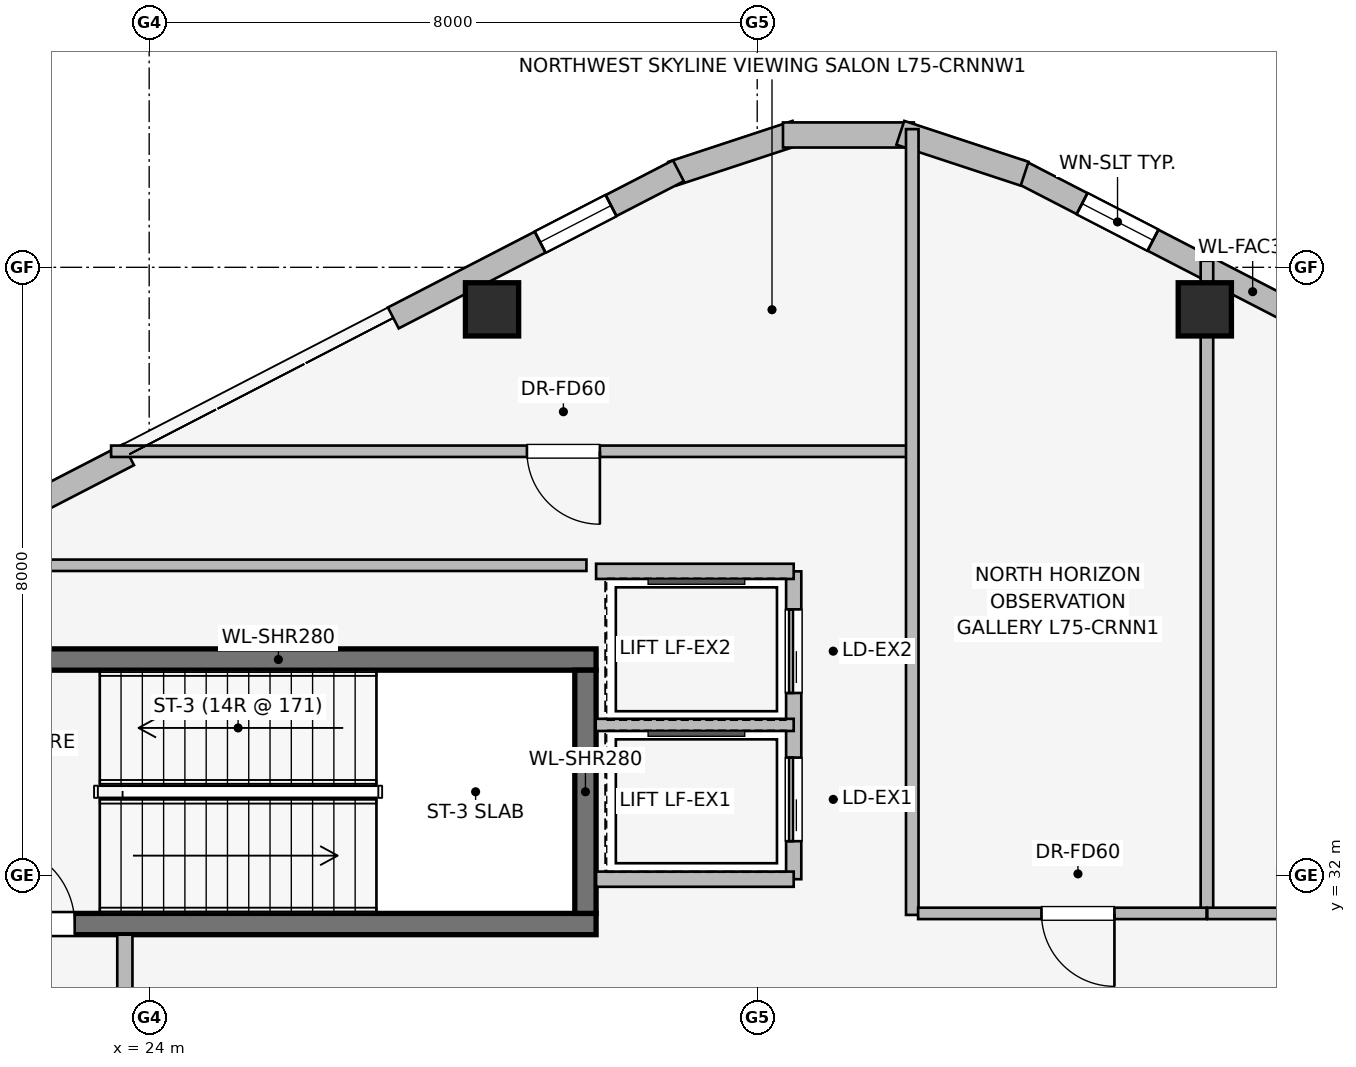
"""IFC4 building model, lengths in metres.
Left out: names, types, materials, properties, quantities, classifications, styles, units other than length and angle.
Written with IfcOpenShell. Run it as: python <this file> out.ifc"""

import sys

from ifc_helpers import new_model, si_unit, direction, frame, frame_2d, origin, origin_2d, place, context, subcontext, project, spatial, rectangle, extrude, element, fill, save


model = new_model("IFC4")
c1 = context("Model", 3, precision=1e-05, world=origin(), true_north=direction((0.0, 1.0)))
c2 = subcontext(c1, "Body", "Model", "MODEL_VIEW")
j1 = project(units=[si_unit("LENGTHUNIT", "METRE"), si_unit("PLANEANGLEUNIT", "RADIAN")], contexts=[c1])
p1 = place(None, origin())
s1 = spatial("IfcSite", under=j1, at=p1, CompositionType="ELEMENT")
p2 = place(p1, origin())
s2 = spatial("IfcBuilding", under=s1, at=p2, CompositionType="ELEMENT")
p3 = place(p2, frame((0.0, 0.0, 275.1)))
s3 = spatial("IfcBuildingStorey", under=s2, at=p3, CompositionType="ELEMENT", Elevation=275.1)
p4 = place(p3, frame((21.52, 31.36, 0.0), z_axis=(0.0, 0.0, 1.0), x_axis=(1.0, 0.0, 0.0)))
e1 = element("IfcWall", 1, at=p4, inside=s3, PredefinedType="SHEAR", context=c2, shape_type="SweptSolid", body=[
    extrude(rectangle(XDim=8.36, YDim=0.28, at=frame_2d((4.18, 0.0))), origin(), (0.0, 0.0, 1.0), 4.8),
])
p5 = place(p4, frame((0.45, 0.0, 0.0)))
e2 = element("IfcOpeningElement", 2, at=p5, cuts=e1, PredefinedType="OPENING", context=c2, shape_type="SweptSolid", body=[
    extrude(rectangle(XDim=1.05, YDim=2.0, at=frame_2d((0.525, 1.0))), frame((0.0, 0.15, 0.0), z_axis=(0.0, -1.0, 0.0), x_axis=(1.0, 0.0, 0.0)), (0.0, 0.0, 1.0), 0.3),
])
p6 = place(p3, frame((29.88, 34.84, 0.0), z_axis=(0.0, 0.0, 1.0), x_axis=(-1.0, 0.0, 0.0)))
e3 = element("IfcWall", 3, at=p6, inside=s3, PredefinedType="SHEAR", context=c2, shape_type="SweptSolid", body=[
    extrude(rectangle(XDim=8.36, YDim=0.28, at=frame_2d((4.18, 0.0))), origin(), (0.0, 0.0, 1.0), 4.8),
])
p7 = place(p3, frame((29.74, 31.5, 0.0), z_axis=(0.0, 0.0, 1.0), x_axis=(0.0, 1.0, 0.0)))
e4 = element("IfcWall", 4, at=p7, inside=s3, PredefinedType="SHEAR", context=c2, shape_type="SweptSolid", body=[
    extrude(rectangle(XDim=3.2, YDim=0.28, at=frame_2d((1.6, 0.0))), origin(), (0.0, 0.0, 1.0), 4.8),
])
for number, where, z_axis, x_axis in (
    (5, (37.889, 39.447, 0.0), (0.0, 0.0, 1.0), (1.0, 0.0, 0.0)),
    (6, (28.511, 39.447, 0.0), (0.0, 0.0, 1.0), (1.0, 0.0, 0.0)),
):
    element("IfcColumn", number, at=place(p3, frame(where, z_axis=z_axis, x_axis=x_axis)), inside=s3, PredefinedType="COLUMN", context=c2, shape_type="SweptSolid", body=[
        extrude(rectangle(XDim=0.7, YDim=0.7, at=origin_2d()), origin(), (0.0, 0.0, 1.0), 4.8),
    ])
p8 = place(p3, frame((35.437, 41.27, 0.0), z_axis=(0.0, 0.0, 1.0), x_axis=(0.888622971019, -0.458638436437, 0.0)))
e7 = element("IfcWall", 7, at=p8, inside=s3, PredefinedType="STANDARD", context=c2, shape_type="SweptSolid", body=[
    extrude(rectangle(XDim=6.936, YDim=0.31, at=frame_2d((3.468, 0.0))), origin(), (0.0, 0.0, 1.0), 4.49),
])
p9 = place(p8, frame((0.942, 0.0, 0.75)))
e8 = element("IfcOpeningElement", 8, at=p9, cuts=e7, PredefinedType="OPENING", context=c2, shape_type="SweptSolid", body=[
    extrude(rectangle(XDim=1.05, YDim=1.4, at=frame_2d((0.525, 0.7))), frame((0.0, 0.165, 0.0), z_axis=(0.0, -1.0, 0.0), x_axis=(1.0, 0.0, 0.0)), (0.0, 0.0, 1.0), 0.33),
])
p10 = place(p8, frame((4.435, 0.0, 0.75)))
e9 = element("IfcOpeningElement", 9, at=p10, cuts=e7, PredefinedType="OPENING", context=c2, shape_type="SweptSolid", body=[
    extrude(rectangle(XDim=1.05, YDim=1.4, at=frame_2d((0.525, 0.7))), frame((0.0, 0.165, 0.0), z_axis=(0.0, -1.0, 0.0), x_axis=(1.0, 0.0, 0.0)), (0.0, 0.0, 1.0), 0.33),
])
p11 = place(p3, frame((30.882, 41.231, 0.0), z_axis=(0.0, 0.0, 1.0), x_axis=(0.949713440491, 0.313120393699, 0.0)))
e10 = element("IfcWall", 10, at=p11, inside=s3, PredefinedType="STANDARD", context=c2, shape_type="SweptSolid", body=[
    extrude(rectangle(XDim=1.722, YDim=0.33, at=frame_2d((0.861, 0.0))), origin(), (0.0, 0.0, 1.0), 4.49),
])
p12 = place(p3, frame((32.339, 41.741, 0.0), z_axis=(0.0, 0.0, 1.0), x_axis=(1.0, 0.0, 0.0)))
e11 = element("IfcWall", 11, at=p12, inside=s3, PredefinedType="STANDARD", context=c2, shape_type="SweptSolid", body=[
    extrude(rectangle(XDim=1.722, YDim=0.33, at=frame_2d((0.861, 0.0))), origin(), (0.0, 0.0, 1.0), 4.49),
])
p13 = place(p3, frame((33.883, 41.77, 0.0), z_axis=(0.0, 0.0, 1.0), x_axis=(0.949713440491, -0.313120393699, 0.0)))
e12 = element("IfcWall", 12, at=p13, inside=s3, PredefinedType="STANDARD", context=c2, shape_type="SweptSolid", body=[
    extrude(rectangle(XDim=1.722, YDim=0.33, at=frame_2d((0.861, 0.0))), origin(), (0.0, 0.0, 1.0), 4.49),
])
p14 = place(p3, frame((17.566, 34.354, 0.0), z_axis=(0.0, 0.0, 1.0), x_axis=(0.888622971019, 0.458638436437, 0.0)))
e13 = element("IfcWall", 13, at=p14, inside=s3, PredefinedType="STANDARD", context=c2, shape_type="SweptSolid", body=[
    extrude(rectangle(XDim=6.936, YDim=0.31, at=frame_2d((3.468, 0.0))), origin(), (0.0, 0.0, 1.0), 4.49),
])
p15 = place(p14, frame((0.998, 0.0, 0.75)))
e14 = element("IfcOpeningElement", 14, at=p15, cuts=e13, PredefinedType="OPENING", context=c2, shape_type="SweptSolid", body=[
    extrude(rectangle(XDim=1.05, YDim=1.4, at=frame_2d((0.525, 0.7))), frame((0.0, 0.165, 0.0), z_axis=(0.0, -1.0, 0.0), x_axis=(1.0, 0.0, 0.0)), (0.0, 0.0, 1.0), 0.33),
])
p16 = place(p14, frame((4.403, 0.0, 0.75)))
e15 = element("IfcOpeningElement", 15, at=p16, cuts=e13, PredefinedType="OPENING", context=c2, shape_type="SweptSolid", body=[
    extrude(rectangle(XDim=1.05, YDim=1.4, at=frame_2d((0.525, 0.7))), frame((0.0, 0.165, 0.0), z_axis=(0.0, -1.0, 0.0), x_axis=(1.0, 0.0, 0.0)), (0.0, 0.0, 1.0), 0.33),
])
p17 = place(p3, frame((27.212, 39.334, 0.0), z_axis=(0.0, 0.0, 1.0), x_axis=(0.888616094641, 0.45865175934, 0.0)))
e16 = element("IfcWall", 16, at=p17, inside=s3, PredefinedType="STANDARD", context=c2, shape_type="SweptSolid", body=[
    extrude(rectangle(XDim=4.221, YDim=0.31, at=frame_2d((2.111, 0.0))), origin(), (0.0, 0.0, 1.0), 4.49),
])
p18 = place(p17, frame((2.174, 0.0, 0.75)))
e17 = element("IfcOpeningElement", 17, at=p18, cuts=e16, PredefinedType="OPENING", context=c2, shape_type="SweptSolid", body=[
    extrude(rectangle(XDim=1.05, YDim=1.4, at=frame_2d((0.525, 0.7))), frame((0.0, 0.165, 0.0), z_axis=(0.0, -1.0, 0.0), x_axis=(1.0, 0.0, 0.0)), (0.0, 0.0, 1.0), 0.33),
])
p19 = place(p3, frame((23.68, 25.68, 0.0), z_axis=(0.0, 0.0, 1.0), x_axis=(0.0, 1.0, 0.0)))
e18 = element("IfcWall", 18, at=p19, inside=s3, PredefinedType="PARTITIONING", context=c2, shape_type="SweptSolid", body=[
    extrude(rectangle(XDim=5.54, YDim=0.2, at=frame_2d((2.77, 0.0))), origin(), (0.0, 0.0, 1.0), 4.49),
])
p20 = place(p19, frame((1.8, 0.0, 0.0)))
e19 = element("IfcOpeningElement", 19, at=p20, cuts=e18, PredefinedType="OPENING", context=c2, shape_type="SweptSolid", body=[
    extrude(rectangle(XDim=1.05, YDim=2.0, at=frame_2d((0.525, 1.0))), frame((0.0, 0.11, 0.0), z_axis=(0.0, -1.0, 0.0), x_axis=(1.0, 0.0, 0.0)), (0.0, 0.0, 1.0), 0.22),
])
p21 = place(p3, frame((32.48, 31.95, 0.0), z_axis=(0.0, 0.0, 1.0), x_axis=(0.0, 1.0, 0.0)))
e20 = element("IfcWall", 20, at=p21, inside=s3, PredefinedType="PARTITIONING", context=c2, shape_type="SweptSolid", body=[
    extrude(rectangle(XDim=4.05, YDim=0.2, at=frame_2d((2.025, 0.0))), origin(), (0.0, 0.0, 1.0), 4.49),
])
p22 = place(p21, frame((0.5, 0.0, 0.0)))
e21 = element("IfcOpeningElement", 21, at=p22, cuts=e20, PredefinedType="OPENING", context=c2, shape_type="SweptSolid", body=[
    extrude(rectangle(XDim=1.1, YDim=2.2, at=frame_2d((0.55, 1.1))), frame((0.0, 0.11, 0.0), z_axis=(0.0, -1.0, 0.0), x_axis=(1.0, 0.0, 0.0)), (0.0, 0.0, 1.0), 0.22),
])
p23 = place(p21, frame((2.45, 0.0, 0.0)))
e22 = element("IfcOpeningElement", 22, at=p23, cuts=e20, PredefinedType="OPENING", context=c2, shape_type="SweptSolid", body=[
    extrude(rectangle(XDim=1.1, YDim=2.2, at=frame_2d((0.55, 1.1))), frame((0.0, 0.11, 0.0), z_axis=(0.0, -1.0, 0.0), x_axis=(1.0, 0.0, 0.0)), (0.0, 0.0, 1.0), 0.22),
])
p24 = place(p3, frame((29.88, 36.0, 0.0), z_axis=(0.0, 0.0, 1.0), x_axis=(1.0, 0.0, 0.0)))
e23 = element("IfcWall", 23, at=p24, inside=s3, PredefinedType="PARTITIONING", context=c2, shape_type="SweptSolid", body=[
    extrude(rectangle(XDim=2.6, YDim=0.2, at=frame_2d((1.3, 0.0))), origin(), (0.0, 0.0, 1.0), 4.49),
])
p25 = place(p3, frame((32.48, 31.95, 0.0), z_axis=(0.0, 0.0, 1.0), x_axis=(-1.0, 0.0, 0.0)))
e24 = element("IfcWall", 24, at=p25, inside=s3, PredefinedType="PARTITIONING", context=c2, shape_type="SweptSolid", body=[
    extrude(rectangle(XDim=2.6, YDim=0.2, at=frame_2d((1.3, 0.0))), origin(), (0.0, 0.0, 1.0), 3.882),
])
p26 = place(p3, frame((29.875, 33.98, 0.0), z_axis=(0.0, 0.0, 1.0), x_axis=(1.0, 0.0, 0.0)))
e25 = element("IfcWall", 25, at=p26, inside=s3, PredefinedType="PARTITIONING", context=c2, shape_type="SweptSolid", body=[
    extrude(rectangle(XDim=2.605, YDim=0.16, at=frame_2d((1.302, 0.0))), origin(), (0.0, 0.0, 1.0), 4.49),
])
p27 = place(p3, frame((34.0, 37.58, 0.0), z_axis=(0.0, 0.0, 1.0), x_axis=(-1.0, 0.0, 0.0)))
e26 = element("IfcWall", 26, at=p27, inside=s3, PredefinedType="PARTITIONING", context=c2, shape_type="SweptSolid", body=[
    extrude(rectangle(XDim=10.501, YDim=0.15, at=frame_2d((5.25, 0.0))), origin(), (0.0, 0.0, 1.0), 4.49),
])
p28 = place(p27, frame((4.07, 0.0, 0.0)))
e27 = element("IfcOpeningElement", 27, at=p28, cuts=e26, PredefinedType="OPENING", context=c2, shape_type="SweptSolid", body=[
    extrude(rectangle(XDim=0.96, YDim=2.0, at=frame_2d((0.48, 1.0))), frame((0.0, 0.085, 0.0), z_axis=(0.0, -1.0, 0.0), x_axis=(1.0, 0.0, 0.0)), (0.0, 0.0, 1.0), 0.17),
])
p29 = place(p3, frame((34.04, 31.48, 0.0), z_axis=(0.0, 0.0, 1.0), x_axis=(0.0, 1.0, 0.0)))
e28 = element("IfcWall", 28, at=p29, inside=s3, PredefinedType="PARTITIONING", context=c2, shape_type="SweptSolid", body=[
    extrude(rectangle(XDim=10.338, YDim=0.165, at=frame_2d((5.169, 0.0))), origin(), (0.0, 0.0, 1.0), 4.49),
])
p30 = place(p3, frame((37.917, 31.51, 0.0), z_axis=(0.0, 0.0, 1.0), x_axis=(0.0, 1.0, 0.0)))
e29 = element("IfcWall", 29, at=p30, inside=s3, PredefinedType="PARTITIONING", context=c2, shape_type="SweptSolid", body=[
    extrude(rectangle(XDim=8.576, YDim=0.165, at=frame_2d((4.288, 0.0))), origin(), (0.0, 0.0, 1.0), 3.879),
])
p31 = place(p3, frame((37.912, 31.5, 0.0), z_axis=(0.0, 0.0, 1.0), x_axis=(-1.0, 0.0, 0.0)))
e30 = element("IfcWall", 30, at=p31, inside=s3, PredefinedType="PARTITIONING", context=c2, shape_type="SweptSolid", body=[
    extrude(rectangle(XDim=3.795, YDim=0.15, at=frame_2d((1.897, 0.0))), origin(), (0.0, 0.0, 1.0), 4.49),
])
p32 = place(p31, frame((1.212, 0.0, 0.0)))
e31 = element("IfcOpeningElement", 31, at=p32, cuts=e30, PredefinedType="OPENING", context=c2, shape_type="SweptSolid", body=[
    extrude(rectangle(XDim=0.96, YDim=2.0, at=frame_2d((0.48, 1.0))), frame((0.0, 0.085, 0.0), z_axis=(0.0, -1.0, 0.0), x_axis=(1.0, 0.0, 0.0)), (0.0, 0.0, 1.0), 0.17),
])
p33 = place(p3, frame((41.38, 31.5, 0.0), z_axis=(0.0, 0.0, 1.0), x_axis=(-1.0, 0.0, 0.0)))
e32 = element("IfcWall", 32, at=p33, inside=s3, PredefinedType="PARTITIONING", context=c2, shape_type="SweptSolid", body=[
    extrude(rectangle(XDim=3.458, YDim=0.15, at=frame_2d((1.729, 0.0))), origin(), (0.0, 0.0, 1.0), 4.49),
])
p34 = place(p33, frame((1.484, 0.0, 0.0)))
e33 = element("IfcOpeningElement", 33, at=p34, cuts=e32, PredefinedType="OPENING", context=c2, shape_type="SweptSolid", body=[
    extrude(rectangle(XDim=0.96, YDim=2.0, at=frame_2d((0.48, 1.0))), frame((0.0, 0.085, 0.0), z_axis=(0.0, -1.0, 0.0), x_axis=(1.0, 0.0, 0.0)), (0.0, 0.0, 1.0), 0.17),
])
p35 = place(p3, frame((29.753, 36.08, 0.0), z_axis=(0.0, 0.0, 1.0), x_axis=(-1.0, 0.0, 0.0)))
e34 = element("IfcWall", 34, at=p35, inside=s3, PredefinedType="PARTITIONING", context=c2, shape_type="SweptSolid", body=[
    extrude(rectangle(XDim=7.353, YDim=0.15, at=frame_2d((3.677, 0.0))), origin(), (0.0, 0.0, 1.0), 4.49),
])
p36 = place(p9, origin())
e35 = element("IfcWindow", 35, at=p36, inside=s3, PartitioningType="SINGLE_PANEL", PredefinedType="WINDOW", context=c2, shape_type="SweptSolid", body=[
    extrude(rectangle(XDim=1.05, YDim=1.4, at=frame_2d((0.525, 0.7))), frame((0.0, 0.03, 0.0), z_axis=(0.0, -1.0, 0.0), x_axis=(1.0, 0.0, 0.0)), (0.0, 0.0, 1.0), 0.06),
])
fill(e8, e35)
p37 = place(p18, origin())
e36 = element("IfcWindow", 36, at=p37, inside=s3, PartitioningType="SINGLE_PANEL", PredefinedType="WINDOW", context=c2, shape_type="SweptSolid", body=[
    extrude(rectangle(XDim=1.05, YDim=1.4, at=frame_2d((0.525, 0.7))), frame((0.0, 0.03, 0.0), z_axis=(0.0, -1.0, 0.0), x_axis=(1.0, 0.0, 0.0)), (0.0, 0.0, 1.0), 0.06),
])
fill(e17, e36)
p38 = place(p5, origin())
e37 = element("IfcDoor", 37, at=p38, inside=s3, OperationType="SINGLE_SWING_LEFT", PredefinedType="DOOR", context=c2, shape_type="SweptSolid", body=[
    extrude(rectangle(XDim=1.05, YDim=2.0, at=frame_2d((0.525, 1.0))), frame((0.0, 0.025, 0.0), z_axis=(0.0, -1.0, 0.0), x_axis=(1.0, 0.0, 0.0)), (0.0, 0.0, 1.0), 0.05),
])
fill(e2, e37)
p39 = place(p22, origin())
e38 = element("IfcDoor", 38, at=p39, inside=s3, OperationType="SLIDING_TO_LEFT", PredefinedType="DOOR", context=c2, shape_type="SweptSolid", body=[
    extrude(rectangle(XDim=1.1, YDim=2.2, at=frame_2d((0.55, 1.1))), frame((0.0, 0.025, 0.0), z_axis=(0.0, -1.0, 0.0), x_axis=(1.0, 0.0, 0.0)), (0.0, 0.0, 1.0), 0.05),
])
fill(e21, e38)
p40 = place(p23, origin())
e39 = element("IfcDoor", 39, at=p40, inside=s3, OperationType="SLIDING_TO_LEFT", PredefinedType="DOOR", context=c2, shape_type="SweptSolid", body=[
    extrude(rectangle(XDim=1.1, YDim=2.2, at=frame_2d((0.55, 1.1))), frame((0.0, 0.025, 0.0), z_axis=(0.0, -1.0, 0.0), x_axis=(1.0, 0.0, 0.0)), (0.0, 0.0, 1.0), 0.05),
])
fill(e22, e39)
p41 = place(p28, origin())
e40 = element("IfcDoor", 40, at=p41, inside=s3, OperationType="SINGLE_SWING_LEFT", PredefinedType="DOOR", context=c2, shape_type="SweptSolid", body=[
    extrude(rectangle(XDim=0.96, YDim=2.0, at=frame_2d((0.48, 1.0))), frame((0.0, 0.025, 0.0), z_axis=(0.0, -1.0, 0.0), x_axis=(1.0, 0.0, 0.0)), (0.0, 0.0, 1.0), 0.05),
])
fill(e27, e40)
p42 = place(p32, origin())
e41 = element("IfcDoor", 41, at=p42, inside=s3, OperationType="SINGLE_SWING_LEFT", PredefinedType="DOOR", context=c2, shape_type="SweptSolid", body=[
    extrude(rectangle(XDim=0.96, YDim=2.0, at=frame_2d((0.48, 1.0))), frame((0.0, 0.025, 0.0), z_axis=(0.0, -1.0, 0.0), x_axis=(1.0, 0.0, 0.0)), (0.0, 0.0, 1.0), 0.05),
])
fill(e31, e41)
save(model, sys.argv[1])
